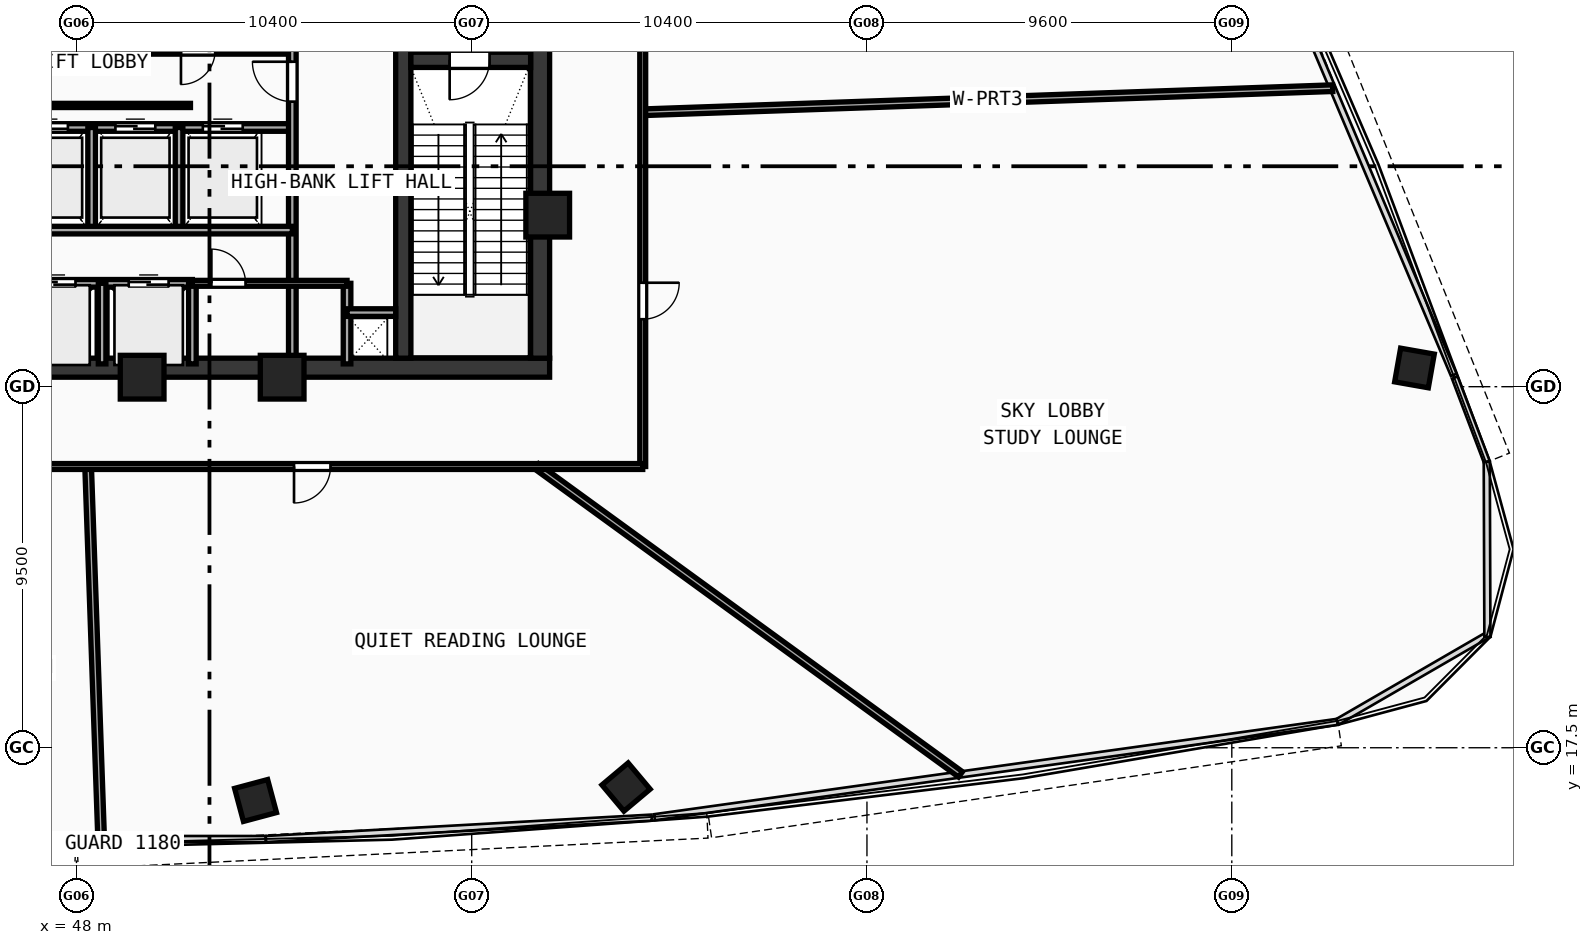
"""IFC4 building model, lengths in metres.
Left out: names, types, materials, properties, quantities, classifications, styles, units other than length and angle.
Written with IfcOpenShell. Run it as: python <this file> out.ifc"""

import sys

from ifc_helpers import new_model, si_unit, direction, frame, frame_2d, origin, origin_with_axes, origin_2d, place, context, subcontext, project, spatial, rectangle, hollow_rectangle, extrude, source, transform, mapped, element, fill, save


model = new_model("IFC4")
c1 = context("Model", 3, precision=1e-05, world=origin(), true_north=direction((0.0, 1.0)))
c2 = subcontext(c1, "Body", "Model", "MODEL_VIEW")
j1 = project(units=[si_unit("LENGTHUNIT", "METRE"), si_unit("PLANEANGLEUNIT", "RADIAN")], contexts=[c1])
p1 = place(None, origin())
s1 = spatial("IfcSite", under=j1, at=p1, CompositionType="ELEMENT")
p2 = place(p1, origin())
s2 = spatial("IfcBuilding", under=s1, at=p2, CompositionType="ELEMENT")
p3 = place(p2, frame((0.0, 0.0, 218.96)))
s3 = spatial("IfcBuildingStorey", under=s2, at=p3, CompositionType="ELEMENT", Elevation=218.96)
p4 = place(p3, frame((35.55, 27.5, 0.0), z_axis=(0.0, 0.0, 1.0), x_axis=(1.0, 0.0, 0.0)))
e1 = element("IfcWall", 1, at=p4, inside=s3, PredefinedType="SHEAR", context=c2, shape_type="SweptSolid", body=[
    extrude(rectangle(XDim=24.9, YDim=0.5, at=frame_2d((12.45, 0.0))), origin(), (0.0, 0.0, 1.0), 5.57),
])
p5 = place(p3, frame((60.2, 27.75, 0.0), z_axis=(0.0, 0.0, 1.0), x_axis=(0.0, 1.0, 0.0)))
e2 = element("IfcWall", 2, at=p5, inside=s3, PredefinedType="SHEAR", context=c2, shape_type="SweptSolid", body=[
    extrude(rectangle(XDim=12.2, YDim=0.5, at=frame_2d((6.1, 0.0))), origin(), (0.0, 0.0, 1.0), 5.57),
])
p6 = place(p3, frame((56.6, 27.75, 0.0), z_axis=(0.0, 0.0, 1.0), x_axis=(0.0, 1.0, 0.0)))
e3 = element("IfcWall", 3, at=p6, inside=s3, PredefinedType="SHEAR", context=c2, shape_type="SweptSolid", body=[
    extrude(rectangle(XDim=12.2, YDim=0.4, at=frame_2d((6.1, 0.0))), origin(), (0.0, 0.0, 1.0), 5.57),
])
p7 = place(p6, frame((10.0, 0.0, 0.0)))
e4 = element("IfcOpeningElement", 4, at=p7, cuts=e3, PredefinedType="OPENING", context=c2, shape_type="SweptSolid", body=[
    extrude(rectangle(XDim=1.1, YDim=2.1, at=frame_2d((0.55, 1.05))), frame((0.0, 0.21, 0.0), z_axis=(0.0, -1.0, 0.0), x_axis=(1.0, 0.0, 0.0)), (0.0, 0.0, 1.0), 0.42),
])
p8 = place(p3, frame((56.8, 35.6, 0.0), z_axis=(0.0, 0.0, 1.0), x_axis=(1.0, 0.0, 0.0)))
e5 = element("IfcWall", 5, at=p8, inside=s3, PredefinedType="SHEAR", context=c2, shape_type="SweptSolid", body=[
    extrude(rectangle(XDim=3.15, YDim=0.4, at=frame_2d((1.575, 0.0))), origin(), (0.0, 0.0, 1.0), 5.57),
])
p9 = place(p8, frame((1.02, 0.0, 0.0)))
e6 = element("IfcOpeningElement", 6, at=p9, cuts=e5, PredefinedType="OPENING", context=c2, shape_type="SweptSolid", body=[
    extrude(rectangle(XDim=1.05, YDim=2.1, at=frame_2d((0.525, 1.05))), frame((0.0, 0.21, 0.0), z_axis=(0.0, -1.0, 0.0), x_axis=(1.0, 0.0, 0.0)), (0.0, 0.0, 1.0), 0.42),
])
m1 = source(origin(), c2, "Body", "SweptSolid", [
    extrude(hollow_rectangle(XDim=1.15, YDim=1.15, WallThickness=0.048, at=origin_2d()), origin(), (0.0, 0.0, 1.0), 5.85),
])
for number, where, z_axis, x_axis in (
    (7, (49.729, 27.25, -0.28), (0.0, 0.0, 1.0), (1.0, 0.0, 0.0)),
    (8, (53.412, 27.25, -0.28), (0.0, 0.0, 1.0), (1.0, 0.0, 0.0)),
    (9, (60.4, 31.513, -0.28), (0.0, 0.0, 1.0), (1.0, 0.0, 0.0)),
):
    element("IfcColumn", number, at=place(p3, frame(where, z_axis=z_axis, x_axis=x_axis)), inside=s3, PredefinedType="COLUMN", context=c2, shape_type="MappedRepresentation", body=[
        mapped(m1, transform((0.0, 0.0, 0.0), scale=1.0)),
    ])
m2 = source(origin(), c2, "Body", "SweptSolid", [
    extrude(hollow_rectangle(XDim=0.9, YDim=0.9, WallThickness=0.036, at=origin_2d()), origin(), (0.0, 0.0, 1.0), 5.85),
])
for number, where, z_axis, x_axis in (
    (10, (52.713, 16.112, -0.28), (0.0, 0.0, 1.0), (0.966, 0.259, 0.0)),
    (11, (62.461, 16.466, -0.28), (0.0, 0.0, 1.0), (0.766, 0.643, 0.0)),
    (12, (83.207, 27.492, -0.28), (0.0, 0.0, 1.0), (0.174, 0.985, 0.0)),
):
    element("IfcColumn", number, at=place(p3, frame(where, z_axis=z_axis, x_axis=x_axis)), inside=s3, PredefinedType="COLUMN", context=c2, shape_type="MappedRepresentation", body=[
        mapped(m2, transform((0.0, 0.0, 0.0), scale=1.0)),
    ])
p10 = place(p3, frame((48.95, 35.85, 0.0), z_axis=(0.0, 0.0, 1.0), x_axis=(1.0, 0.0, 0.0)))
e13 = element("IfcWall", 13, at=p10, inside=s3, PredefinedType="SOLIDWALL", context=c2, shape_type="SweptSolid", body=[
    extrude(rectangle(XDim=4.73, YDim=0.2, at=frame_2d((2.365, 0.0))), origin(), (0.0, 0.0, 1.0), 5.57),
])
p11 = place(p10, frame((1.8, 0.0, 0.0)))
e14 = element("IfcOpeningElement", 14, at=p11, cuts=e13, PredefinedType="OPENING", context=c2, shape_type="SweptSolid", body=[
    extrude(rectangle(XDim=0.9, YDim=2.1, at=frame_2d((0.45, 1.05))), frame((0.0, 0.11, 0.0), z_axis=(0.0, -1.0, 0.0), x_axis=(1.0, 0.0, 0.0)), (0.0, 0.0, 1.0), 0.22),
])
p12 = place(p3, frame((43.85, 33.82, 0.0), z_axis=(0.0, 0.0, 1.0), x_axis=(1.0, 0.0, 0.0)))
e15 = element("IfcWall", 15, at=p12, inside=s3, PredefinedType="SOLIDWALL", context=c2, shape_type="SweptSolid", body=[
    extrude(rectangle(XDim=9.83, YDim=0.2, at=frame_2d((4.915, 0.0))), origin(), (0.0, 0.0, 1.0), 5.57),
])
p13 = place(p12, frame((0.575, 0.0, 0.0)))
e16 = element("IfcOpeningElement", 16, at=p13, cuts=e15, PredefinedType="OPENING", context=c2, shape_type="SweptSolid", body=[
    extrude(rectangle(XDim=1.05, YDim=2.1, at=frame_2d((0.525, 1.05))), frame((0.0, 0.11, 0.0), z_axis=(0.0, -1.0, 0.0), x_axis=(1.0, 0.0, 0.0)), (0.0, 0.0, 1.0), 0.22),
])
p14 = place(p12, frame((2.875, 0.0, 0.0)))
e17 = element("IfcOpeningElement", 17, at=p14, cuts=e15, PredefinedType="OPENING", context=c2, shape_type="SweptSolid", body=[
    extrude(rectangle(XDim=1.05, YDim=2.1, at=frame_2d((0.525, 1.05))), frame((0.0, 0.11, 0.0), z_axis=(0.0, -1.0, 0.0), x_axis=(1.0, 0.0, 0.0)), (0.0, 0.0, 1.0), 0.22),
])
p15 = place(p12, frame((5.175, 0.0, 0.0)))
e18 = element("IfcOpeningElement", 18, at=p15, cuts=e15, PredefinedType="OPENING", context=c2, shape_type="SweptSolid", body=[
    extrude(rectangle(XDim=1.05, YDim=2.1, at=frame_2d((0.525, 1.05))), frame((0.0, 0.11, 0.0), z_axis=(0.0, -1.0, 0.0), x_axis=(1.0, 0.0, 0.0)), (0.0, 0.0, 1.0), 0.22),
])
p16 = place(p12, frame((7.475, 0.0, 0.0)))
e19 = element("IfcOpeningElement", 19, at=p16, cuts=e15, PredefinedType="OPENING", context=c2, shape_type="SweptSolid", body=[
    extrude(rectangle(XDim=1.05, YDim=2.1, at=frame_2d((0.525, 1.05))), frame((0.0, 0.11, 0.0), z_axis=(0.0, -1.0, 0.0), x_axis=(1.0, 0.0, 0.0)), (0.0, 0.0, 1.0), 0.22),
])
p17 = place(p3, frame((53.68, 27.6, 0.0), z_axis=(0.0, 0.0, 1.0), x_axis=(0.0, 1.0, 0.0)))
e20 = element("IfcWall", 20, at=p17, inside=s3, PredefinedType="SOLIDWALL", context=c2, shape_type="SweptSolid", body=[
    extrude(rectangle(XDim=9.05, YDim=0.2, at=frame_2d((4.525, 0.0))), origin(), (0.0, 0.0, 1.0), 2.22),
])
p18 = place(p17, frame((6.9, 0.0, 0.0)))
e21 = element("IfcOpeningElement", 21, at=p18, cuts=e20, PredefinedType="OPENING", context=c2, shape_type="SweptSolid", body=[
    extrude(rectangle(XDim=1.05, YDim=2.1, at=frame_2d((0.525, 1.05))), frame((0.0, 0.11, 0.0), z_axis=(0.0, -1.0, 0.0), x_axis=(1.0, 0.0, 0.0)), (0.0, 0.0, 1.0), 0.22),
])
for number, where, z_axis, x_axis in (
    (22, (48.4, 31.12, 0.0), (0.0, 0.0, 1.0), (0.0, 1.0, 0.0)),
    (23, (50.7, 31.12, 0.0), (0.0, 0.0, 1.0), (0.0, 1.0, 0.0)),
):
    element("IfcWall", number, at=place(p3, frame(where, z_axis=z_axis, x_axis=x_axis)), inside=s3, PredefinedType="SOLIDWALL", context=c2, shape_type="SweptSolid", body=[
        extrude(rectangle(XDim=2.7, YDim=0.2, at=frame_2d((1.35, 0.0))), origin(), (0.0, 0.0, 1.0), 5.57),
    ])
p19 = place(p3, frame((43.85, 29.72, 0.0), z_axis=(0.0, 0.0, 1.0), x_axis=(1.0, 0.0, 0.0)))
e24 = element("IfcWall", 24, at=p19, inside=s3, PredefinedType="SOLIDWALL", context=c2, shape_type="SweptSolid", body=[
    extrude(rectangle(XDim=7.2, YDim=0.2, at=frame_2d((3.6, 0.0))), origin(), (0.0, 0.0, 1.0), 5.57),
])
p20 = place(p19, frame((0.625, 0.0, 0.0)))
e25 = element("IfcOpeningElement", 25, at=p20, cuts=e24, PredefinedType="OPENING", context=c2, shape_type="SweptSolid", body=[
    extrude(rectangle(XDim=1.05, YDim=2.1, at=frame_2d((0.525, 1.05))), frame((0.0, 0.11, 0.0), z_axis=(0.0, -1.0, 0.0), x_axis=(1.0, 0.0, 0.0)), (0.0, 0.0, 1.0), 0.22),
])
p21 = place(p19, frame((3.075, 0.0, 0.0)))
e26 = element("IfcOpeningElement", 26, at=p21, cuts=e24, PredefinedType="OPENING", context=c2, shape_type="SweptSolid", body=[
    extrude(rectangle(XDim=1.05, YDim=2.1, at=frame_2d((0.525, 1.05))), frame((0.0, 0.11, 0.0), z_axis=(0.0, -1.0, 0.0), x_axis=(1.0, 0.0, 0.0)), (0.0, 0.0, 1.0), 0.22),
])
p22 = place(p19, frame((5.525, 0.0, 0.0)))
e27 = element("IfcOpeningElement", 27, at=p22, cuts=e24, PredefinedType="OPENING", context=c2, shape_type="SweptSolid", body=[
    extrude(rectangle(XDim=1.05, YDim=2.1, at=frame_2d((0.525, 1.05))), frame((0.0, 0.11, 0.0), z_axis=(0.0, -1.0, 0.0), x_axis=(1.0, 0.0, 0.0)), (0.0, 0.0, 1.0), 0.22),
])
p23 = place(p3, frame((51.05, 27.6, 0.0), z_axis=(0.0, 0.0, 1.0), x_axis=(0.0, 1.0, 0.0)))
e28 = element("IfcWall", 28, at=p23, inside=s3, PredefinedType="SOLIDWALL", context=c2, shape_type="SweptSolid", body=[
    extrude(rectangle(XDim=2.12, YDim=0.2, at=frame_2d((1.06, 0.0))), origin(), (0.0, 0.0, 1.0), 5.57),
])
p24 = place(p3, frame((43.85, 31.12, 0.0), z_axis=(0.0, 0.0, 1.0), x_axis=(1.0, 0.0, 0.0)))
e29 = element("IfcWall", 29, at=p24, inside=s3, PredefinedType="SOLIDWALL", context=c2, shape_type="SweptSolid", body=[
    extrude(rectangle(XDim=9.83, YDim=0.2, at=frame_2d((4.915, 0.0))), origin(), (0.0, 0.0, 1.0), 5.57),
])
for number, where, z_axis, x_axis in (
    (30, (48.675, 27.6, 0.0), (0.0, 0.0, 1.0), (0.0, 1.0, 0.0)),
    (31, (55.12, 27.6, 0.0), (0.0, 0.0, 1.0), (0.0, 1.0, 0.0)),
):
    element("IfcWall", number, at=place(p3, frame(where, z_axis=z_axis, x_axis=x_axis)), inside=s3, PredefinedType="SOLIDWALL", context=c2, shape_type="SweptSolid", body=[
        extrude(rectangle(XDim=2.12, YDim=0.2, at=frame_2d((1.06, 0.0))), origin(), (0.0, 0.0, 1.0), 5.57),
    ])
p25 = place(p3, frame((55.12, 28.95, 0.0), z_axis=(0.0, 0.0, 1.0), x_axis=(1.0, 0.0, 0.0)))
e32 = element("IfcWall", 32, at=p25, inside=s3, PredefinedType="SOLIDWALL", context=c2, shape_type="SweptSolid", body=[
    extrude(rectangle(XDim=1.28, YDim=0.2, at=frame_2d((0.64, 0.0))), origin(), (0.0, 0.0, 1.0), 5.57),
])
p26 = place(p3, frame((51.05, 29.72, 0.0), z_axis=(0.0, 0.0, 1.0), x_axis=(1.0, 0.0, 0.0)))
e33 = element("IfcWall", 33, at=p26, inside=s3, PredefinedType="PARTITIONING", context=c2, shape_type="SweptSolid", body=[
    extrude(rectangle(XDim=4.07, YDim=0.155, at=frame_2d((2.035, 0.0))), origin(), (0.0, 0.0, 1.0), 5.57),
])
p27 = place(p26, frame((0.5, 0.0, 0.0)))
e34 = element("IfcOpeningElement", 34, at=p27, cuts=e33, PredefinedType="OPENING", context=c2, shape_type="SweptSolid", body=[
    extrude(rectangle(XDim=0.9, YDim=2.1, at=frame_2d((0.45, 1.05))), frame((0.0, 0.087, 0.0), z_axis=(0.0, -1.0, 0.0), x_axis=(1.0, 0.0, 0.0)), (0.0, 0.0, 1.0), 0.175),
])
p28 = place(p3, frame((62.9, 34.22, 0.0), z_axis=(0.0, 0.0, 1.0), x_axis=(0.999390657583, 0.034904348392, 0.0)))
e35 = element("IfcWall", 35, at=p28, inside=s3, PredefinedType="PARTITIONING", context=c2, shape_type="SweptSolid", body=[
    extrude(rectangle(XDim=18.165, YDim=0.175, at=frame_2d((9.083, 0.0))), origin(), (0.0, 0.0, 1.0), 4.92),
])
p29 = place(p3, frame((48.307, 24.9, 0.0), z_axis=(0.0, 0.0, 1.0), x_axis=(0.034898652042, -0.999390856515, 0.0)))
e36 = element("IfcWall", 36, at=p29, inside=s3, PredefinedType="PARTITIONING", context=c2, shape_type="SweptSolid", body=[
    extrude(rectangle(XDim=9.808, YDim=0.175, at=frame_2d((4.904, 0.0))), origin(), (0.0, 0.0, 1.0), 4.92),
])
p30 = place(p3, frame((60.112, 24.9, 0.0), z_axis=(0.0, 0.0, 1.0), x_axis=(0.809020959596, -0.587779794596, 0.0)))
e37 = element("IfcWall", 37, at=p30, inside=s3, PredefinedType="PARTITIONING", context=c2, shape_type="SweptSolid", body=[
    extrude(rectangle(XDim=13.782, YDim=0.175, at=frame_2d((6.891, 0.0))), origin(), (0.0, 0.0, 1.0), 4.92),
])
p31 = place(p3, frame((62.9, 42.9, 0.0), z_axis=(0.0, 0.0, 1.0), x_axis=(0.0, -1.0, 0.0)))
e38 = element("IfcWall", 38, at=p31, inside=s3, PredefinedType="PARTITIONING", context=c2, shape_type="SweptSolid", body=[
    extrude(rectangle(XDim=18.0, YDim=0.155, at=frame_2d((9.0, 0.0))), origin(), (0.0, 0.0, 1.0), 2.22),
])
p32 = place(p31, frame((3.565, 0.0, 0.0)))
e39 = element("IfcOpeningElement", 39, at=p32, cuts=e38, PredefinedType="OPENING", context=c2, shape_type="SweptSolid", body=[
    extrude(rectangle(XDim=0.96, YDim=2.12, at=frame_2d((0.48, 1.06))), frame((0.0, 0.087, 0.0), z_axis=(0.0, -1.0, 0.0), x_axis=(1.0, 0.0, 0.0)), (0.0, 0.0, 1.0), 0.175),
])
p33 = place(p31, frame((13.165, 0.0, 0.0)))
e40 = element("IfcOpeningElement", 40, at=p33, cuts=e38, PredefinedType="OPENING", context=c2, shape_type="SweptSolid", body=[
    extrude(rectangle(XDim=0.96, YDim=2.12, at=frame_2d((0.48, 1.06))), frame((0.0, 0.087, 0.0), z_axis=(0.0, -1.0, 0.0), x_axis=(1.0, 0.0, 0.0)), (0.0, 0.0, 1.0), 0.175),
])
p34 = place(p3, frame((62.9, 24.9, 0.0), z_axis=(0.0, 0.0, 1.0), x_axis=(-1.0, 0.0, 0.0)))
e41 = element("IfcWall", 41, at=p34, inside=s3, PredefinedType="PARTITIONING", context=c2, shape_type="SweptSolid", body=[
    extrude(rectangle(XDim=29.8, YDim=0.155, at=frame_2d((14.9, 0.0))), origin(), (0.0, 0.0, 1.0), 2.22),
])
p35 = place(p34, frame((24.514, 0.0, 0.0)))
e42 = element("IfcOpeningElement", 42, at=p35, cuts=e41, PredefinedType="OPENING", context=c2, shape_type="SweptSolid", body=[
    extrude(rectangle(XDim=0.96, YDim=2.12, at=frame_2d((0.48, 1.06))), frame((0.0, 0.087, 0.0), z_axis=(0.0, -1.0, 0.0), x_axis=(1.0, 0.0, 0.0)), (0.0, 0.0, 1.0), 0.175),
])
p36 = place(p34, frame((16.611, 0.0, 0.0)))
e43 = element("IfcOpeningElement", 43, at=p36, cuts=e41, PredefinedType="OPENING", context=c2, shape_type="SweptSolid", body=[
    extrude(rectangle(XDim=0.96, YDim=2.12, at=frame_2d((0.48, 1.06))), frame((0.0, 0.087, 0.0), z_axis=(0.0, -1.0, 0.0), x_axis=(1.0, 0.0, 0.0)), (0.0, 0.0, 1.0), 0.175),
])
p37 = place(p34, frame((8.215, 0.0, 0.0)))
e44 = element("IfcOpeningElement", 44, at=p37, cuts=e41, PredefinedType="OPENING", context=c2, shape_type="SweptSolid", body=[
    extrude(rectangle(XDim=0.96, YDim=2.12, at=frame_2d((0.48, 1.06))), frame((0.0, 0.087, 0.0), z_axis=(0.0, -1.0, 0.0), x_axis=(1.0, 0.0, 0.0)), (0.0, 0.0, 1.0), 0.175),
])
p38 = place(p3, frame((45.0, 34.4, 0.0), z_axis=(0.0, 0.0, 1.0), x_axis=(1.0, 0.0, 0.0)))
e45 = element("IfcWall", 45, at=p38, inside=s3, PredefinedType="MOVABLE", context=c2, shape_type="SweptSolid", body=[
    extrude(rectangle(XDim=6.0, YDim=0.11, at=frame_2d((3.0, 0.0))), origin(), (0.0, 0.0, 1.0), 2.5),
])
m3 = source(origin(), c2, "Body", "SweptSolid", [
    extrude(rectangle(XDim=1.05, YDim=2.1, at=frame_2d((0.525, 1.05))), frame((0.0, 0.025, 0.0), z_axis=(0.0, -1.0, 0.0), x_axis=(1.0, 0.0, 0.0)), (0.0, 0.0, 1.0), 0.05),
])
p39 = place(p9, frame((1.05, 0.0, 0.0), z_axis=(0.0, 0.0, 1.0), x_axis=(-1.0, 0.0, 0.0)))
e46 = element("IfcDoor", 46, at=p39, inside=s3, OperationType="SINGLE_SWING_RIGHT", PredefinedType="DOOR", context=c2, shape_type="MappedRepresentation", body=[
    mapped(m3, transform((0.0, 0.0, 0.0), scale=1.0)),
])
fill(e6, e46)
p40 = place(p14, origin_with_axes())
e47 = element("IfcDoor", 47, at=p40, inside=s3, OperationType="DOUBLE_DOOR_SLIDING", PredefinedType="DOOR", context=c2, shape_type="MappedRepresentation", body=[
    mapped(m3, transform((0.0, 0.0, 0.0), scale=1.0)),
])
fill(e17, e47)
p41 = place(p15, origin_with_axes())
e48 = element("IfcDoor", 48, at=p41, inside=s3, OperationType="DOUBLE_DOOR_SLIDING", PredefinedType="DOOR", context=c2, shape_type="MappedRepresentation", body=[
    mapped(m3, transform((0.0, 0.0, 0.0), scale=1.0)),
])
fill(e18, e48)
p42 = place(p16, origin_with_axes())
e49 = element("IfcDoor", 49, at=p42, inside=s3, OperationType="DOUBLE_DOOR_SLIDING", PredefinedType="DOOR", context=c2, shape_type="MappedRepresentation", body=[
    mapped(m3, transform((0.0, 0.0, 0.0), scale=1.0)),
])
fill(e19, e49)
p43 = place(p18, origin_with_axes())
e50 = element("IfcDoor", 50, at=p43, inside=s3, OperationType="SINGLE_SWING_RIGHT", PredefinedType="DOOR", context=c2, shape_type="MappedRepresentation", body=[
    mapped(m3, transform((0.0, 0.0, 0.0), scale=1.0)),
])
fill(e21, e50)
p44 = place(p21, origin_with_axes())
e51 = element("IfcDoor", 51, at=p44, inside=s3, OperationType="DOUBLE_DOOR_SLIDING", PredefinedType="DOOR", context=c2, shape_type="MappedRepresentation", body=[
    mapped(m3, transform((0.0, 0.0, 0.0), scale=1.0)),
])
fill(e26, e51)
p45 = place(p22, origin_with_axes())
e52 = element("IfcDoor", 52, at=p45, inside=s3, OperationType="DOUBLE_DOOR_SLIDING", PredefinedType="DOOR", context=c2, shape_type="MappedRepresentation", body=[
    mapped(m3, transform((0.0, 0.0, 0.0), scale=1.0)),
])
fill(e27, e52)
m4 = source(origin(), c2, "Body", "SweptSolid", [
    extrude(rectangle(XDim=0.9, YDim=2.1, at=frame_2d((0.45, 1.05))), frame((0.0, 0.025, 0.0), z_axis=(0.0, -1.0, 0.0), x_axis=(1.0, 0.0, 0.0)), (0.0, 0.0, 1.0), 0.05),
])
p46 = place(p27, origin_with_axes())
e53 = element("IfcDoor", 53, at=p46, inside=s3, OperationType="SINGLE_SWING_LEFT", PredefinedType="DOOR", context=c2, shape_type="MappedRepresentation", body=[
    mapped(m4, transform((0.0, 0.0, 0.0), scale=1.0)),
])
fill(e34, e53)
m5 = source(origin(), c2, "Body", "SweptSolid", [
    extrude(rectangle(XDim=0.96, YDim=2.12, at=frame_2d((0.48, 1.06))), frame((0.0, 0.025, 0.0), z_axis=(0.0, -1.0, 0.0), x_axis=(1.0, 0.0, 0.0)), (0.0, 0.0, 1.0), 0.05),
])
p47 = place(p37, origin_with_axes())
e54 = element("IfcDoor", 54, at=p47, inside=s3, OperationType="SINGLE_SWING_RIGHT", PredefinedType="DOOR", context=c2, shape_type="MappedRepresentation", body=[
    mapped(m5, transform((0.0, 0.0, 0.0), scale=1.0)),
])
fill(e44, e54)
p48 = place(p33, origin_with_axes())
e55 = element("IfcDoor", 55, at=p48, inside=s3, OperationType="SINGLE_SWING_LEFT", PredefinedType="DOOR", context=c2, shape_type="MappedRepresentation", body=[
    mapped(m5, transform((0.0, 0.0, 0.0), scale=1.0)),
])
fill(e40, e55)
save(model, sys.argv[1])
